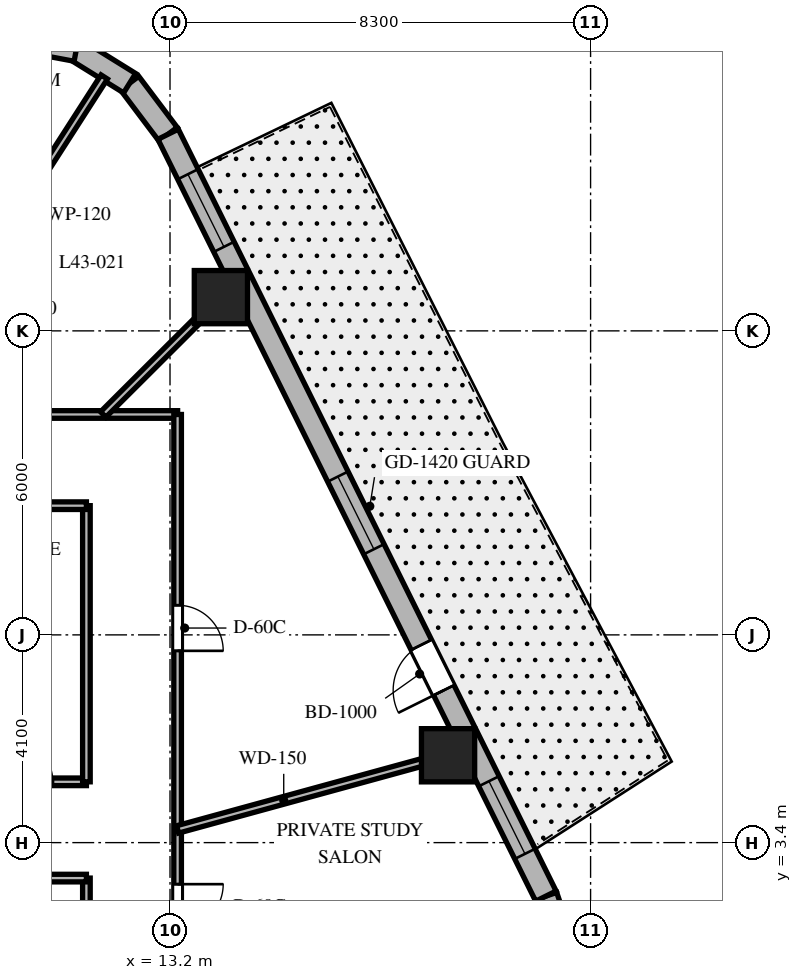
"""IFC4 building model, lengths in metres.
Left out: names, types, materials, properties, quantities, classifications, styles, units other than length and angle.
Written with IfcOpenShell. Run it as: python <this file> out.ifc"""

import sys

from ifc_helpers import new_model, si_unit, direction, frame, frame_2d, origin, origin_2d, place, context, subcontext, project, spatial, rectangle, extrude, element, fill, save


model = new_model("IFC4")
c1 = context("Model", 3, precision=1e-05, world=origin(), true_north=direction((0.0, 1.0)))
c2 = subcontext(c1, "Body", "Model", "MODEL_VIEW")
j1 = project(units=[si_unit("LENGTHUNIT", "METRE"), si_unit("PLANEANGLEUNIT", "RADIAN")], contexts=[c1])
p1 = place(None, origin())
s1 = spatial("IfcSite", under=j1, at=p1, CompositionType="ELEMENT")
p2 = place(p1, origin())
s2 = spatial("IfcBuilding", under=s1, at=p2, CompositionType="ELEMENT")
p3 = place(p2, frame((0.0, 0.0, 175.6)))
s3 = spatial("IfcBuildingStorey", under=s2, at=p3, CompositionType="ELEMENT", Elevation=175.6)
for number, where, z_axis, x_axis in (
    (1, (18.687, 5.124, 0.0), (0.0, 0.0, 1.0), (1.0, 0.0, 0.0)),
    (2, (14.204, 14.166, 0.0), (0.0, 0.0, 1.0), (1.0, 0.0, 0.0)),
):
    element("IfcColumn", number, at=place(p3, frame(where, z_axis=z_axis, x_axis=x_axis)), inside=s3, PredefinedType="COLUMN", context=c2, shape_type="SweptSolid", body=[
        extrude(rectangle(XDim=1.05, YDim=1.05, at=origin_2d()), origin(), (0.0, 0.0, 1.0), 3.7),
    ])
p4 = place(p3, frame((20.911, 1.484, 0.0), z_axis=(0.0, 0.0, 1.0), x_axis=(-0.321623334353, 0.946867694453, 0.0)))
e3 = element("IfcWall", 3, at=p4, inside=s3, PredefinedType="SOLIDWALL", context=c2, shape_type="SweptSolid", body=[
    extrude(rectangle(XDim=0.909, YDim=0.45, at=frame_2d((0.454, 0.0))), origin(), (0.0, 0.0, 1.0), 3.4),
])
p5 = place(p3, frame((13.162, 17.381, 0.0), z_axis=(0.0, 0.0, 1.0), x_axis=(-0.601515770517, 0.798860925205, 0.0)))
e4 = element("IfcWall", 4, at=p5, inside=s3, PredefinedType="SOLIDWALL", context=c2, shape_type="SweptSolid", body=[
    extrude(rectangle(XDim=1.262, YDim=0.45, at=frame_2d((0.631, 0.0))), origin(), (0.0, 0.0, 1.0), 3.4),
])
p6 = place(p3, frame((12.403, 18.389, 0.0), z_axis=(0.0, 0.0, 1.0), x_axis=(-0.849795170926, 0.527113049991, 0.0)))
e5 = element("IfcWall", 5, at=p6, inside=s3, PredefinedType="SOLIDWALL", context=c2, shape_type="SweptSolid", body=[
    extrude(rectangle(XDim=1.241, YDim=0.45, at=frame_2d((0.62, 0.0))), origin(), (0.0, 0.0, 1.0), 3.4),
])
p7 = place(p3, frame((11.349, 19.043, 0.0), z_axis=(0.0, 0.0, 1.0), x_axis=(-0.982931267051, 0.183973161772, 0.0)))
e6 = element("IfcWall", 6, at=p7, inside=s3, PredefinedType="SOLIDWALL", context=c2, shape_type="SweptSolid", body=[
    extrude(rectangle(XDim=1.262, YDim=0.45, at=frame_2d((0.631, 0.0))), origin(), (0.0, 0.0, 1.0), 3.4),
])
p8 = place(p3, frame((20.618, 2.344, 0.0), z_axis=(0.0, 0.0, 1.0), x_axis=(-0.444243691097, 0.895905990002, 0.0)))
e7 = element("IfcWall", 7, at=p8, inside=s3, PredefinedType="SOLIDWALL", context=c2, shape_type="SweptSolid", body=[
    extrude(rectangle(XDim=16.784, YDim=0.45, at=frame_2d((8.392, 0.0))), origin(), (0.0, 0.0, 1.0), 3.4),
])
p9 = place(p8, frame((4.535, 0.0, 0.0)))
e8 = element("IfcOpeningElement", 8, at=p9, cuts=e7, PredefinedType="OPENING", context=c2, shape_type="SweptSolid", body=[
    extrude(rectangle(XDim=1.0, YDim=2.15, at=frame_2d((0.5, 1.075))), frame((0.0, 0.235, 0.0), z_axis=(0.0, -1.0, 0.0), x_axis=(1.0, 0.0, 0.0)), (0.0, 0.0, 1.0), 0.47),
])
p10 = place(p8, frame((0.931, 0.0, 0.8)))
e9 = element("IfcOpeningElement", 9, at=p10, cuts=e7, PredefinedType="OPENING", context=c2, shape_type="SweptSolid", body=[
    extrude(rectangle(XDim=1.6, YDim=1.75, at=frame_2d((0.8, 0.875))), frame((0.0, 0.235, 0.0), z_axis=(0.0, -1.0, 0.0), x_axis=(1.0, 0.0, 0.0)), (0.0, 0.0, 1.0), 0.47),
])
p11 = place(p8, frame((7.642, 0.0, 0.8)))
e10 = element("IfcOpeningElement", 10, at=p11, cuts=e7, PredefinedType="OPENING", context=c2, shape_type="SweptSolid", body=[
    extrude(rectangle(XDim=1.6, YDim=1.75, at=frame_2d((0.8, 0.875))), frame((0.0, 0.235, 0.0), z_axis=(0.0, -1.0, 0.0), x_axis=(1.0, 0.0, 0.0)), (0.0, 0.0, 1.0), 0.47),
])
p12 = place(p8, frame((14.303, 0.0, 0.8)))
e11 = element("IfcOpeningElement", 11, at=p12, cuts=e7, PredefinedType="OPENING", context=c2, shape_type="SweptSolid", body=[
    extrude(rectangle(XDim=1.6, YDim=1.75, at=frame_2d((0.8, 0.875))), frame((0.0, 0.235, 0.0), z_axis=(0.0, -1.0, 0.0), x_axis=(1.0, 0.0, 0.0)), (0.0, 0.0, 1.0), 0.47),
])
p13 = place(p3, frame((-13.35, 11.85, 0.0), z_axis=(0.0, 0.0, 1.0), x_axis=(1.0, 0.0, 0.0)))
e12 = element("IfcWall", 12, at=p13, inside=s3, PredefinedType="PARTITIONING", context=c2, shape_type="SweptSolid", body=[
    extrude(rectangle(XDim=26.7, YDim=0.15, at=frame_2d((13.35, 0.0))), origin(), (0.0, 0.0, 1.0), 2.84),
])
p14 = place(p13, frame((22.7, 0.0, 0.0)))
e13 = element("IfcOpeningElement", 13, at=p14, cuts=e12, PredefinedType="OPENING", context=c2, shape_type="SweptSolid", body=[
    extrude(rectangle(XDim=0.9, YDim=2.03, at=frame_2d((0.45, 1.015))), frame((0.0, 0.085, 0.0), z_axis=(0.0, -1.0, 0.0), x_axis=(1.0, 0.0, 0.0)), (0.0, 0.0, 1.0), 0.17),
])
p15 = place(p13, frame((18.523, 0.0, 0.0)))
e14 = element("IfcOpeningElement", 14, at=p15, cuts=e12, PredefinedType="OPENING", context=c2, shape_type="SweptSolid", body=[
    extrude(rectangle(XDim=0.95, YDim=2.03, at=frame_2d((0.475, 1.015))), frame((0.0, 0.085, 0.0), z_axis=(0.0, -1.0, 0.0), x_axis=(1.0, 0.0, 0.0)), (0.0, 0.0, 1.0), 0.17),
])
p16 = place(p13, frame((14.469, 0.0, 0.0)))
e15 = element("IfcOpeningElement", 15, at=p16, cuts=e12, PredefinedType="OPENING", context=c2, shape_type="SweptSolid", body=[
    extrude(rectangle(XDim=0.95, YDim=2.03, at=frame_2d((0.475, 1.015))), frame((0.0, 0.085, 0.0), z_axis=(0.0, -1.0, 0.0), x_axis=(1.0, 0.0, 0.0)), (0.0, 0.0, 1.0), 0.17),
])
p17 = place(p13, frame((10.314, 0.0, 0.0)))
e16 = element("IfcOpeningElement", 16, at=p17, cuts=e12, PredefinedType="OPENING", context=c2, shape_type="SweptSolid", body=[
    extrude(rectangle(XDim=0.95, YDim=2.03, at=frame_2d((0.475, 1.015))), frame((0.0, 0.085, 0.0), z_axis=(0.0, -1.0, 0.0), x_axis=(1.0, 0.0, 0.0)), (0.0, 0.0, 1.0), 0.17),
])
p18 = place(p13, frame((6.061, 0.0, 0.0)))
e17 = element("IfcOpeningElement", 17, at=p18, cuts=e12, PredefinedType="OPENING", context=c2, shape_type="SweptSolid", body=[
    extrude(rectangle(XDim=0.95, YDim=2.03, at=frame_2d((0.475, 1.015))), frame((0.0, 0.085, 0.0), z_axis=(0.0, -1.0, 0.0), x_axis=(1.0, 0.0, 0.0)), (0.0, 0.0, 1.0), 0.17),
])
p19 = place(p13, frame((1.886, 0.0, 0.0)))
e18 = element("IfcOpeningElement", 18, at=p19, cuts=e12, PredefinedType="OPENING", context=c2, shape_type="SweptSolid", body=[
    extrude(rectangle(XDim=0.9, YDim=2.03, at=frame_2d((0.45, 1.015))), frame((0.0, 0.085, 0.0), z_axis=(0.0, -1.0, 0.0), x_axis=(1.0, 0.0, 0.0)), (0.0, 0.0, 1.0), 0.17),
])
p20 = place(p3, frame((13.35, 11.85, 0.0), z_axis=(0.0, 0.0, 1.0), x_axis=(0.0, -1.0, 0.0)))
e19 = element("IfcWall", 19, at=p20, inside=s3, PredefinedType="PARTITIONING", context=c2, shape_type="SweptSolid", body=[
    extrude(rectangle(XDim=23.7, YDim=0.15, at=frame_2d((11.85, 0.0))), origin(), (0.0, 0.0, 1.0), 2.84),
])
p21 = place(p20, frame((9.27, 0.0, 0.0)))
e20 = element("IfcOpeningElement", 20, at=p21, cuts=e19, PredefinedType="OPENING", context=c2, shape_type="SweptSolid", body=[
    extrude(rectangle(XDim=0.9, YDim=2.03, at=frame_2d((0.45, 1.015))), frame((0.0, 0.085, 0.0), z_axis=(0.0, -1.0, 0.0), x_axis=(1.0, 0.0, 0.0)), (0.0, 0.0, 1.0), 0.17),
])
p22 = place(p20, frame((3.765, 0.0, 0.0)))
e21 = element("IfcOpeningElement", 21, at=p22, cuts=e19, PredefinedType="OPENING", context=c2, shape_type="SweptSolid", body=[
    extrude(rectangle(XDim=0.9, YDim=2.03, at=frame_2d((0.45, 1.015))), frame((0.0, 0.085, 0.0), z_axis=(0.0, -1.0, 0.0), x_axis=(1.0, 0.0, 0.0)), (0.0, 0.0, 1.0), 0.17),
])
p23 = place(p20, frame((20.662, 0.0, 0.0)))
e22 = element("IfcOpeningElement", 22, at=p23, cuts=e19, PredefinedType="OPENING", context=c2, shape_type="SweptSolid", body=[
    extrude(rectangle(XDim=0.9, YDim=2.03, at=frame_2d((0.45, 1.015))), frame((0.0, 0.085, 0.0), z_axis=(0.0, -1.0, 0.0), x_axis=(1.0, 0.0, 0.0)), (0.0, 0.0, 1.0), 0.17),
])
p24 = place(p20, frame((16.055, 0.0, 0.0)))
e23 = element("IfcOpeningElement", 23, at=p24, cuts=e19, PredefinedType="OPENING", context=c2, shape_type="SweptSolid", body=[
    extrude(rectangle(XDim=0.95, YDim=2.03, at=frame_2d((0.475, 1.015))), frame((0.0, 0.085, 0.0), z_axis=(0.0, -1.0, 0.0), x_axis=(1.0, 0.0, 0.0)), (0.0, 0.0, 1.0), 0.17),
])
p25 = place(p20, frame((12.315, 0.0, 0.0)))
e24 = element("IfcOpeningElement", 24, at=p25, cuts=e19, PredefinedType="OPENING", context=c2, shape_type="SweptSolid", body=[
    extrude(rectangle(XDim=0.9, YDim=2.03, at=frame_2d((0.45, 1.015))), frame((0.0, 0.085, 0.0), z_axis=(0.0, -1.0, 0.0), x_axis=(1.0, 0.0, 0.0)), (0.0, 0.0, 1.0), 0.17),
])
p26 = place(p3, frame((11.55, -10.05, 0.0), z_axis=(0.0, 0.0, 1.0), x_axis=(0.0, 1.0, 0.0)))
e25 = element("IfcWall", 25, at=p26, inside=s3, PredefinedType="PARTITIONING", context=c2, shape_type="SweptSolid", body=[
    extrude(rectangle(XDim=12.75, YDim=0.15, at=frame_2d((6.375, 0.0))), origin(), (0.0, 0.0, 1.0), 2.84),
])
p27 = place(p26, frame((5.95, 0.0, 0.0)))
e26 = element("IfcOpeningElement", 26, at=p27, cuts=e25, PredefinedType="OPENING", context=c2, shape_type="SweptSolid", body=[
    extrude(rectangle(XDim=0.85, YDim=2.03, at=frame_2d((0.425, 1.015))), frame((0.0, 0.085, 0.0), z_axis=(0.0, -1.0, 0.0), x_axis=(1.0, 0.0, 0.0)), (0.0, 0.0, 1.0), 0.17),
])
p28 = place(p3, frame((11.55, 2.7, 0.0), z_axis=(0.0, 0.0, 1.0), x_axis=(-1.0, 0.0, 0.0)))
e27 = element("IfcWall", 27, at=p28, inside=s3, PredefinedType="PARTITIONING", context=c2, shape_type="SweptSolid", body=[
    extrude(rectangle(XDim=2.175, YDim=0.15, at=frame_2d((1.087, 0.0))), origin(), (0.0, 0.0, 1.0), 3.4),
])
p29 = place(p3, frame((9.375, 4.6, 0.0), z_axis=(0.0, 0.0, 1.0), x_axis=(1.0, 0.0, 0.0)))
e28 = element("IfcWall", 28, at=p29, inside=s3, PredefinedType="PARTITIONING", context=c2, shape_type="SweptSolid", body=[
    extrude(rectangle(XDim=2.175, YDim=0.15, at=frame_2d((1.087, 0.0))), origin(), (0.0, 0.0, 1.0), 3.4),
])
p30 = place(p29, frame((0.663, 0.0, 0.0)))
e29 = element("IfcOpeningElement", 29, at=p30, cuts=e28, PredefinedType="OPENING", context=c2, shape_type="SweptSolid", body=[
    extrude(rectangle(XDim=0.85, YDim=2.03, at=frame_2d((0.425, 1.015))), frame((0.0, 0.085, 0.0), z_axis=(0.0, -1.0, 0.0), x_axis=(1.0, 0.0, 0.0)), (0.0, 0.0, 1.0), 0.17),
])
p31 = place(p3, frame((11.55, 4.6, 0.0), z_axis=(0.0, 0.0, 1.0), x_axis=(0.0, 1.0, 0.0)))
e30 = element("IfcWall", 30, at=p31, inside=s3, PredefinedType="PARTITIONING", context=c2, shape_type="SweptSolid", body=[
    extrude(rectangle(XDim=5.45, YDim=0.15, at=frame_2d((2.725, 0.0))), origin(), (0.0, 0.0, 1.0), 2.84),
])
p32 = place(p3, frame((11.55, 10.05, 0.0), z_axis=(0.0, 0.0, 1.0), x_axis=(-1.0, 0.0, 0.0)))
e31 = element("IfcWall", 31, at=p32, inside=s3, PredefinedType="PARTITIONING", context=c2, shape_type="SweptSolid", body=[
    extrude(rectangle(XDim=9.65, YDim=0.15, at=frame_2d((4.825, 0.0))), origin(), (0.0, 0.0, 1.0), 2.84),
])
p33 = place(p3, frame((13.35, 3.661, 0.0), z_axis=(0.0, 0.0, 1.0), x_axis=(0.964397145454, 0.264458211898, 0.0)))
e32 = element("IfcWall", 32, at=p33, inside=s3, PredefinedType="PARTITIONING", context=c2, shape_type="SweptSolid", body=[
    extrude(rectangle(XDim=6.039, YDim=0.15, at=frame_2d((3.019, 0.0))), origin(), (0.0, 0.0, 1.0), 2.64),
])
p34 = place(p3, frame((11.882, 11.85, 0.0), z_axis=(0.0, 0.0, 1.0), x_axis=(0.708037373639, 0.706174962407, 0.0)))
e33 = element("IfcWall", 33, at=p34, inside=s3, PredefinedType="PARTITIONING", context=c2, shape_type="SweptSolid", body=[
    extrude(rectangle(XDim=3.802, YDim=0.15, at=frame_2d((1.901, 0.0))), origin(), (0.0, 0.0, 1.0), 2.64),
])
p35 = place(p3, frame((7.619, 11.85, 0.0), z_axis=(0.0, 0.0, 1.0), x_axis=(0.540829263478, 0.841132396098, 0.0)))
e34 = element("IfcWall", 34, at=p35, inside=s3, PredefinedType="PARTITIONING", context=c2, shape_type="SweptSolid", body=[
    extrude(rectangle(XDim=7.919, YDim=0.15, at=frame_2d((3.959, 0.0))), origin(), (0.0, 0.0, 1.0), 2.64),
])
p36 = place(p9, origin())
e35 = element("IfcDoor", 35, at=p36, inside=s3, OperationType="SINGLE_SWING_LEFT", PredefinedType="DOOR", context=c2, shape_type="SweptSolid", body=[
    extrude(rectangle(XDim=1.0, YDim=2.15, at=frame_2d((0.5, 1.075))), frame((0.0, 0.025, 0.0), z_axis=(0.0, -1.0, 0.0), x_axis=(1.0, 0.0, 0.0)), (0.0, 0.0, 1.0), 0.05),
])
fill(e8, e35)
p37 = place(p10, origin())
e36 = element("IfcWindow", 36, at=p37, inside=s3, PartitioningType="SINGLE_PANEL", PredefinedType="WINDOW", context=c2, shape_type="SweptSolid", body=[
    extrude(rectangle(XDim=1.6, YDim=1.75, at=frame_2d((0.8, 0.875))), frame((0.0, 0.03, 0.0), z_axis=(0.0, -1.0, 0.0), x_axis=(1.0, 0.0, 0.0)), (0.0, 0.0, 1.0), 0.06),
])
fill(e9, e36)
p38 = place(p11, origin())
e37 = element("IfcWindow", 37, at=p38, inside=s3, PartitioningType="SINGLE_PANEL", PredefinedType="WINDOW", context=c2, shape_type="SweptSolid", body=[
    extrude(rectangle(XDim=1.6, YDim=1.75, at=frame_2d((0.8, 0.875))), frame((0.0, 0.03, 0.0), z_axis=(0.0, -1.0, 0.0), x_axis=(1.0, 0.0, 0.0)), (0.0, 0.0, 1.0), 0.06),
])
fill(e10, e37)
p39 = place(p12, origin())
e38 = element("IfcWindow", 38, at=p39, inside=s3, PartitioningType="SINGLE_PANEL", PredefinedType="WINDOW", context=c2, shape_type="SweptSolid", body=[
    extrude(rectangle(XDim=1.6, YDim=1.75, at=frame_2d((0.8, 0.875))), frame((0.0, 0.03, 0.0), z_axis=(0.0, -1.0, 0.0), x_axis=(1.0, 0.0, 0.0)), (0.0, 0.0, 1.0), 0.06),
])
fill(e11, e38)
p40 = place(p30, origin())
e39 = element("IfcDoor", 39, at=p40, inside=s3, OperationType="SINGLE_SWING_LEFT", PredefinedType="DOOR", context=c2, shape_type="SweptSolid", body=[
    extrude(rectangle(XDim=0.85, YDim=2.03, at=frame_2d((0.425, 1.015))), frame((0.0, 0.025, 0.0), z_axis=(0.0, -1.0, 0.0), x_axis=(1.0, 0.0, 0.0)), (0.0, 0.0, 1.0), 0.05),
])
fill(e29, e39)
p41 = place(p21, origin())
e40 = element("IfcDoor", 40, at=p41, inside=s3, OperationType="SINGLE_SWING_LEFT", PredefinedType="DOOR", context=c2, shape_type="SweptSolid", body=[
    extrude(rectangle(XDim=0.9, YDim=2.03, at=frame_2d((0.45, 1.015))), frame((0.0, 0.025, 0.0), z_axis=(0.0, -1.0, 0.0), x_axis=(1.0, 0.0, 0.0)), (0.0, 0.0, 1.0), 0.05),
])
fill(e20, e40)
p42 = place(p22, origin())
e41 = element("IfcDoor", 41, at=p42, inside=s3, OperationType="SINGLE_SWING_RIGHT", PredefinedType="DOOR", context=c2, shape_type="SweptSolid", body=[
    extrude(rectangle(XDim=0.9, YDim=2.03, at=frame_2d((0.45, 1.015))), frame((0.0, 0.025, 0.0), z_axis=(0.0, -1.0, 0.0), x_axis=(1.0, 0.0, 0.0)), (0.0, 0.0, 1.0), 0.05),
])
fill(e21, e41)
save(model, sys.argv[1])
